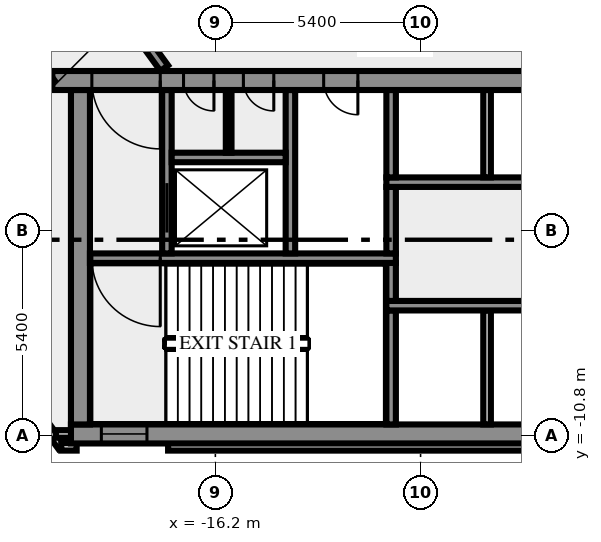
"""IFC4 building model, lengths in metres.
Left out: names, types, materials, properties, quantities, classifications, styles, units other than length and angle.
Written with IfcOpenShell. Run it as: python <this file> out.ifc"""

import sys

from ifc_helpers import new_model, si_unit, direction, frame, frame_2d, origin, place, context, subcontext, project, spatial, rectangle, extrude, element, fill, save


model = new_model("IFC4")
c1 = context("Model", 3, precision=1e-05, world=origin(), true_north=direction((0.0, 1.0)))
c2 = subcontext(c1, "Body", "Model", "MODEL_VIEW")
j1 = project(units=[si_unit("LENGTHUNIT", "METRE"), si_unit("PLANEANGLEUNIT", "RADIAN")], contexts=[c1])
p1 = place(None, origin())
s1 = spatial("IfcSite", under=j1, at=p1, CompositionType="ELEMENT")
p2 = place(p1, origin())
s2 = spatial("IfcBuilding", under=s1, at=p2, CompositionType="ELEMENT")
p3 = place(p2, frame((0.0, 0.0, 79.0)))
s3 = spatial("IfcBuildingStorey", under=s2, at=p3, CompositionType="ELEMENT", Elevation=79.0)
p4 = place(p3, frame((-21.833, -8.909, 0.0), z_axis=(0.0, 0.0, 1.0), x_axis=(0.587766567315, -0.809030569476, 0.0)))
e1 = element("IfcWall", 1, at=p4, inside=s3, PredefinedType="SOLIDWALL", context=c2, shape_type="SweptSolid", body=[
    extrude(rectangle(XDim=2.688, YDim=0.2, at=frame_2d((1.344, 0.0))), origin(), (0.0, 0.0, 1.0), 5.65),
])
p5 = place(p3, frame((-20.256, -11.088, 0.0), z_axis=(0.0, 0.0, 1.0), x_axis=(1.0, 0.0, 0.0)))
e2 = element("IfcWall", 2, at=p5, inside=s3, PredefinedType="SOLIDWALL", context=c2, shape_type="SweptSolid", body=[
    extrude(rectangle(XDim=0.406, YDim=0.2, at=frame_2d((0.203, 0.0))), origin(), (0.0, 0.0, 1.0), 5.65),
])
p6 = place(p3, frame((-17.444, -11.088, 0.0), z_axis=(0.0, 0.0, 1.0), x_axis=(1.0, 0.0, 0.0)))
e3 = element("IfcWall", 3, at=p6, inside=s3, PredefinedType="SOLIDWALL", context=c2, shape_type="SweptSolid", body=[
    extrude(rectangle(XDim=34.888, YDim=0.2, at=frame_2d((17.444, 0.0))), origin(), (0.0, 0.0, 1.0), 5.65),
])
p7 = place(p3, frame((-19.98, -10.75, 0.0), z_axis=(0.0, 0.0, 1.0), x_axis=(-1.0, 0.0, 0.0)))
e4 = element("IfcWall", 4, at=p7, inside=s3, PredefinedType="SOLIDWALL", context=c2, shape_type="SweptSolid", body=[
    extrude(rectangle(XDim=0.417, YDim=0.2, at=frame_2d((0.208, 0.0))), origin(), (0.0, 0.0, 1.0), 5.65),
])
p8 = place(p3, frame((-20.0, -10.75, 0.0), z_axis=(0.0, 0.0, 1.0), x_axis=(1.0, 0.0, 0.0)))
e5 = element("IfcWall", 5, at=p8, inside=s3, PredefinedType="SHEAR", context=c2, shape_type="SweptSolid", body=[
    extrude(rectangle(XDim=40.0, YDim=0.5, at=frame_2d((20.0, 0.0))), origin(), (0.0, 0.0, 1.0), 5.65),
])
p9 = place(p8, frame((0.8, 0.0, 1.0)))
e6 = element("IfcOpeningElement", 6, at=p9, cuts=e5, PredefinedType="OPENING", context=c2, shape_type="SweptSolid", body=[
    extrude(rectangle(XDim=1.2, YDim=1.2, at=frame_2d((0.6, 0.6))), frame((0.0, 0.26, 0.0), z_axis=(0.0, -1.0, 0.0), x_axis=(1.0, 0.0, 0.0)), (0.0, 0.0, 1.0), 0.52),
])
p10 = place(p8, frame((38.0, 0.0, 1.0)))
e7 = element("IfcOpeningElement", 7, at=p10, cuts=e5, PredefinedType="OPENING", context=c2, shape_type="SweptSolid", body=[
    extrude(rectangle(XDim=1.2, YDim=1.2, at=frame_2d((0.6, 0.6))), frame((0.0, 0.26, 0.0), z_axis=(0.0, -1.0, 0.0), x_axis=(1.0, 0.0, 0.0)), (0.0, 0.0, 1.0), 0.52),
])
p11 = place(p3, frame((-19.75, -10.5, 0.0), z_axis=(0.0, 0.0, 1.0), x_axis=(0.0, 1.0, 0.0)))
e8 = element("IfcWall", 8, at=p11, inside=s3, PredefinedType="SHEAR", context=c2, shape_type="SweptSolid", body=[
    extrude(rectangle(XDim=8.8, YDim=0.5, at=frame_2d((4.4, 0.0))), origin(), (0.0, 0.0, 1.0), 5.65),
])
p12 = place(p3, frame((-11.575, -10.5, 0.0), z_axis=(0.0, 0.0, 1.0), x_axis=(0.0, 1.0, 0.0)))
e9 = element("IfcWall", 9, at=p12, inside=s3, PredefinedType="SHEAR", context=c2, shape_type="SweptSolid", body=[
    extrude(rectangle(XDim=3.0, YDim=0.25, at=frame_2d((1.5, 0.0))), origin(), (0.0, 0.0, 1.0), 5.65),
])
p13 = place(p3, frame((-9.05, -10.5, 0.0), z_axis=(0.0, 0.0, 1.0), x_axis=(0.0, 1.0, 0.0)))
e10 = element("IfcWall", 10, at=p13, inside=s3, PredefinedType="SOLIDWALL", context=c2, shape_type="SweptSolid", body=[
    extrude(rectangle(XDim=3.0, YDim=0.2, at=frame_2d((1.5, 0.0))), origin(), (0.0, 0.0, 1.0), 5.65),
])
p14 = place(p3, frame((11.7, -7.375, 0.0), z_axis=(0.0, 0.0, 1.0), x_axis=(-1.0, 0.0, 0.0)))
e11 = element("IfcWall", 11, at=p14, inside=s3, PredefinedType="SHEAR", context=c2, shape_type="SweptSolid", body=[
    extrude(rectangle(XDim=23.4, YDim=0.25, at=frame_2d((11.7, 0.0))), origin(), (0.0, 0.0, 1.0), 5.65),
])
p15 = place(p14, frame((13.975, 0.0, 0.0)))
e12 = element("IfcOpeningElement", 12, at=p15, cuts=e11, PredefinedType="OPENING", context=c2, shape_type="SweptSolid", body=[
    extrude(rectangle(XDim=0.9, YDim=2.1, at=frame_2d((0.45, 1.05))), frame((0.0, 0.135, 0.0), z_axis=(0.0, -1.0, 0.0), x_axis=(1.0, 0.0, 0.0)), (0.0, 0.0, 1.0), 0.27),
])
p16 = place(p14, frame((11.975, 0.0, 0.0)))
e13 = element("IfcOpeningElement", 13, at=p16, cuts=e11, PredefinedType="OPENING", context=c2, shape_type="SweptSolid", body=[
    extrude(rectangle(XDim=0.9, YDim=2.1, at=frame_2d((0.45, 1.05))), frame((0.0, 0.135, 0.0), z_axis=(0.0, -1.0, 0.0), x_axis=(1.0, 0.0, 0.0)), (0.0, 0.0, 1.0), 0.27),
])
p17 = place(p14, frame((10.5, 0.0, 0.0)))
e14 = element("IfcOpeningElement", 14, at=p17, cuts=e11, PredefinedType="OPENING", context=c2, shape_type="SweptSolid", body=[
    extrude(rectangle(XDim=0.9, YDim=2.1, at=frame_2d((0.45, 1.05))), frame((0.0, 0.135, 0.0), z_axis=(0.0, -1.0, 0.0), x_axis=(1.0, 0.0, 0.0)), (0.0, 0.0, 1.0), 0.27),
])
p18 = place(p3, frame((-11.575, -7.25, 0.0), z_axis=(0.0, 0.0, 1.0), x_axis=(0.0, 1.0, 0.0)))
e15 = element("IfcWall", 15, at=p18, inside=s3, PredefinedType="SHEAR", context=c2, shape_type="SweptSolid", body=[
    extrude(rectangle(XDim=1.0, YDim=0.25, at=frame_2d((0.5, 0.0))), origin(), (0.0, 0.0, 1.0), 5.65),
])
p19 = place(p3, frame((-11.45, -6.125, 0.0), z_axis=(0.0, 0.0, 1.0), x_axis=(-1.0, 0.0, 0.0)))
e16 = element("IfcWall", 16, at=p19, inside=s3, PredefinedType="SHEAR", context=c2, shape_type="SweptSolid", body=[
    extrude(rectangle(XDim=8.05, YDim=0.25, at=frame_2d((4.025, 0.0))), origin(), (0.0, 0.0, 1.0), 5.65),
])
p20 = place(p19, frame((6.2, 0.0, 0.0)))
e17 = element("IfcOpeningElement", 17, at=p20, cuts=e16, PredefinedType="OPENING", context=c2, shape_type="SweptSolid", body=[
    extrude(rectangle(XDim=1.8, YDim=2.1, at=frame_2d((0.9, 1.05))), frame((0.0, 0.135, 0.0), z_axis=(0.0, -1.0, 0.0), x_axis=(1.0, 0.0, 0.0)), (0.0, 0.0, 1.0), 0.27),
])
p21 = place(p3, frame((-17.475, -6.0, 0.0), z_axis=(0.0, 0.0, 1.0), x_axis=(0.0, 1.0, 0.0)))
e18 = element("IfcWall", 18, at=p21, inside=s3, PredefinedType="SHEAR", context=c2, shape_type="SweptSolid", body=[
    extrude(rectangle(XDim=4.3, YDim=0.25, at=frame_2d((2.15, 0.0))), origin(), (0.0, 0.0, 1.0), 5.65),
])
p22 = place(p21, frame((0.55, 0.0, 0.0)))
e19 = element("IfcOpeningElement", 19, at=p22, cuts=e18, PredefinedType="OPENING", context=c2, shape_type="SweptSolid", body=[
    extrude(rectangle(XDim=1.3, YDim=2.1, at=frame_2d((0.65, 1.05))), frame((0.0, 0.135, 0.0), z_axis=(0.0, -1.0, 0.0), x_axis=(1.0, 0.0, 0.0)), (0.0, 0.0, 1.0), 0.27),
])
p23 = place(p3, frame((-14.225, -6.0, 0.0), z_axis=(0.0, 0.0, 1.0), x_axis=(0.0, 1.0, 0.0)))
e20 = element("IfcWall", 20, at=p23, inside=s3, PredefinedType="SHEAR", context=c2, shape_type="SweptSolid", body=[
    extrude(rectangle(XDim=4.3, YDim=0.25, at=frame_2d((2.15, 0.0))), origin(), (0.0, 0.0, 1.0), 5.65),
])
p24 = place(p3, frame((-11.575, -6.0, 0.0), z_axis=(0.0, 0.0, 1.0), x_axis=(0.0, 1.0, 0.0)))
e21 = element("IfcWall", 21, at=p24, inside=s3, PredefinedType="SHEAR", context=c2, shape_type="SweptSolid", body=[
    extrude(rectangle(XDim=1.75, YDim=0.25, at=frame_2d((0.875, 0.0))), origin(), (0.0, 0.0, 1.0), 5.65),
])
p25 = place(p3, frame((-11.7, -4.125, 0.0), z_axis=(0.0, 0.0, 1.0), x_axis=(1.0, 0.0, 0.0)))
e22 = element("IfcWall", 22, at=p25, inside=s3, PredefinedType="SHEAR", context=c2, shape_type="SweptSolid", body=[
    extrude(rectangle(XDim=7.75, YDim=0.25, at=frame_2d((3.875, 0.0))), origin(), (0.0, 0.0, 1.0), 5.65),
])
p26 = place(p3, frame((-11.575, -4.0, 0.0), z_axis=(0.0, 0.0, 1.0), x_axis=(0.0, 1.0, 0.0)))
e23 = element("IfcWall", 23, at=p26, inside=s3, PredefinedType="SHEAR", context=c2, shape_type="SweptSolid", body=[
    extrude(rectangle(XDim=2.3, YDim=0.25, at=frame_2d((1.15, 0.0))), origin(), (0.0, 0.0, 1.0), 5.65),
])
p27 = place(p3, frame((-9.05, -4.0, 0.0), z_axis=(0.0, 0.0, 1.0), x_axis=(0.0, 1.0, 0.0)))
e24 = element("IfcWall", 24, at=p27, inside=s3, PredefinedType="SOLIDWALL", context=c2, shape_type="SweptSolid", body=[
    extrude(rectangle(XDim=2.3, YDim=0.2, at=frame_2d((1.15, 0.0))), origin(), (0.0, 0.0, 1.0), 5.65),
])
p28 = place(p3, frame((-17.35, -3.475, 0.0), z_axis=(0.0, 0.0, 1.0), x_axis=(1.0, 0.0, 0.0)))
e25 = element("IfcWall", 25, at=p28, inside=s3, PredefinedType="SHEAR", context=c2, shape_type="SweptSolid", body=[
    extrude(rectangle(XDim=3.0, YDim=0.25, at=frame_2d((1.5, 0.0))), origin(), (0.0, 0.0, 1.0), 5.65),
])
p29 = place(p3, frame((-15.85, -3.35, 0.0), z_axis=(0.0, 0.0, 1.0), x_axis=(0.0, 1.0, 0.0)))
e26 = element("IfcWall", 26, at=p29, inside=s3, PredefinedType="PARTITIONING", context=c2, shape_type="SweptSolid", body=[
    extrude(rectangle(XDim=1.65, YDim=0.15, at=frame_2d((0.825, 0.0))), origin(), (0.0, 0.0, 1.0), 5.65),
])
p30 = place(p3, frame((20.49, -1.45, 0.0), z_axis=(0.0, 0.0, 1.0), x_axis=(-1.0, 0.0, 0.0)))
e27 = element("IfcWall", 27, at=p30, inside=s3, PredefinedType="SHEAR", context=c2, shape_type="SweptSolid", body=[
    extrude(rectangle(XDim=40.98, YDim=0.5, at=frame_2d((20.49, 0.0))), origin(), (0.0, 0.0, 1.0), 5.65),
])
p31 = place(p30, frame((38.14, 0.0, 0.0)))
e28 = element("IfcOpeningElement", 28, at=p31, cuts=e27, PredefinedType="OPENING", context=c2, shape_type="SweptSolid", body=[
    extrude(rectangle(XDim=1.8, YDim=2.1, at=frame_2d((0.9, 1.05))), frame((0.0, 0.26, 0.0), z_axis=(0.0, -1.0, 0.0), x_axis=(1.0, 0.0, 0.0)), (0.0, 0.0, 1.0), 0.52),
])
p32 = place(p30, frame((36.728, 0.0, 0.0)))
e29 = element("IfcOpeningElement", 29, at=p32, cuts=e27, PredefinedType="OPENING", context=c2, shape_type="SweptSolid", body=[
    extrude(rectangle(XDim=0.8, YDim=2.1, at=frame_2d((0.4, 1.05))), frame((0.0, 0.26, 0.0), z_axis=(0.0, -1.0, 0.0), x_axis=(1.0, 0.0, 0.0)), (0.0, 0.0, 1.0), 0.52),
])
p33 = place(p30, frame((35.153, 0.0, 0.0)))
e30 = element("IfcOpeningElement", 30, at=p33, cuts=e27, PredefinedType="OPENING", context=c2, shape_type="SweptSolid", body=[
    extrude(rectangle(XDim=0.8, YDim=2.1, at=frame_2d((0.4, 1.05))), frame((0.0, 0.26, 0.0), z_axis=(0.0, -1.0, 0.0), x_axis=(1.0, 0.0, 0.0)), (0.0, 0.0, 1.0), 0.52),
])
p34 = place(p30, frame((32.94, 0.0, 0.0)))
e31 = element("IfcOpeningElement", 31, at=p34, cuts=e27, PredefinedType="OPENING", context=c2, shape_type="SweptSolid", body=[
    extrude(rectangle(XDim=0.9, YDim=2.1, at=frame_2d((0.45, 1.05))), frame((0.0, 0.26, 0.0), z_axis=(0.0, -1.0, 0.0), x_axis=(1.0, 0.0, 0.0)), (0.0, 0.0, 1.0), 0.52),
])
p35 = place(p30, frame((21.765, 0.0, 0.0)))
e32 = element("IfcOpeningElement", 32, at=p35, cuts=e27, PredefinedType="OPENING", context=c2, shape_type="SweptSolid", body=[
    extrude(rectangle(XDim=2.0, YDim=2.1, at=frame_2d((1.0, 1.05))), frame((0.0, 0.26, 0.0), z_axis=(0.0, -1.0, 0.0), x_axis=(1.0, 0.0, 0.0)), (0.0, 0.0, 1.0), 0.52),
])
p36 = place(p30, frame((7.14, 0.0, 0.0)))
e33 = element("IfcOpeningElement", 33, at=p36, cuts=e27, PredefinedType="OPENING", context=c2, shape_type="SweptSolid", body=[
    extrude(rectangle(XDim=0.9, YDim=2.1, at=frame_2d((0.45, 1.05))), frame((0.0, 0.26, 0.0), z_axis=(0.0, -1.0, 0.0), x_axis=(1.0, 0.0, 0.0)), (0.0, 0.0, 1.0), 0.52),
])
p37 = place(p30, frame((4.19, 0.0, 0.0)))
e34 = element("IfcOpeningElement", 34, at=p37, cuts=e27, PredefinedType="OPENING", context=c2, shape_type="SweptSolid", body=[
    extrude(rectangle(XDim=0.9, YDim=2.1, at=frame_2d((0.45, 1.05))), frame((0.0, 0.26, 0.0), z_axis=(0.0, -1.0, 0.0), x_axis=(1.0, 0.0, 0.0)), (0.0, 0.0, 1.0), 0.52),
])
p38 = place(p30, frame((1.04, 0.0, 0.0)))
e35 = element("IfcOpeningElement", 35, at=p38, cuts=e27, PredefinedType="OPENING", context=c2, shape_type="SweptSolid", body=[
    extrude(rectangle(XDim=1.8, YDim=2.1, at=frame_2d((0.9, 1.05))), frame((0.0, 0.26, 0.0), z_axis=(0.0, -1.0, 0.0), x_axis=(1.0, 0.0, 0.0)), (0.0, 0.0, 1.0), 0.52),
])
p39 = place(p3, frame((-20.531, -1.523, 0.0), z_axis=(0.0, 0.0, 1.0), x_axis=(-0.587785385475, 0.809016897612, 0.0)))
e36 = element("IfcWall", 36, at=p39, inside=s3, PredefinedType="SOLIDWALL", context=c2, shape_type="SweptSolid", body=[
    extrude(rectangle(XDim=50.212, YDim=0.25, at=frame_2d((25.106, 0.0))), origin(), (0.0, 0.0, 1.0), 5.65),
])
p40 = place(p39, frame((22.665, 0.0, 0.0)))
e37 = element("IfcOpeningElement", 37, at=p40, cuts=e36, PredefinedType="OPENING", context=c2, shape_type="SweptSolid", body=[
    extrude(rectangle(XDim=1.2, YDim=2.1, at=frame_2d((0.6, 1.05))), frame((0.0, 0.135, 0.0), z_axis=(0.0, -1.0, 0.0), x_axis=(1.0, 0.0, 0.0)), (0.0, 0.0, 1.0), 0.27),
])
p41 = place(p39, frame((38.865, 0.0, 0.0)))
e38 = element("IfcOpeningElement", 38, at=p41, cuts=e36, PredefinedType="OPENING", context=c2, shape_type="SweptSolid", body=[
    extrude(rectangle(XDim=0.9, YDim=2.1, at=frame_2d((0.45, 1.05))), frame((0.0, 0.135, 0.0), z_axis=(0.0, -1.0, 0.0), x_axis=(1.0, 0.0, 0.0)), (0.0, 0.0, 1.0), 0.27),
])
p42 = place(p39, frame((0.533, 0.0, 0.0)))
e39 = element("IfcOpeningElement", 39, at=p42, cuts=e36, PredefinedType="OPENING", context=c2, shape_type="SweptSolid", body=[
    extrude(rectangle(XDim=1.2, YDim=2.1, at=frame_2d((0.6, 1.05))), frame((0.0, 0.135, 0.0), z_axis=(0.0, -1.0, 0.0), x_axis=(1.0, 0.0, 0.0)), (0.0, 0.0, 1.0), 0.27),
])
p43 = place(p39, frame((15.366, 0.0, 0.0)))
e40 = element("IfcOpeningElement", 40, at=p43, cuts=e36, PredefinedType="OPENING", context=c2, shape_type="SweptSolid", body=[
    extrude(rectangle(XDim=1.2, YDim=2.1, at=frame_2d((0.6, 1.05))), frame((0.0, 0.135, 0.0), z_axis=(0.0, -1.0, 0.0), x_axis=(1.0, 0.0, 0.0)), (0.0, 0.0, 1.0), 0.27),
])
p44 = place(p39, frame((21.066, 0.0, 0.0)))
e41 = element("IfcOpeningElement", 41, at=p44, cuts=e36, PredefinedType="OPENING", context=c2, shape_type="SweptSolid", body=[
    extrude(rectangle(XDim=0.9, YDim=2.1, at=frame_2d((0.45, 1.05))), frame((0.0, 0.135, 0.0), z_axis=(0.0, -1.0, 0.0), x_axis=(1.0, 0.0, 0.0)), (0.0, 0.0, 1.0), 0.27),
])
p45 = place(p3, frame((-37.232, 25.972, 0.0), z_axis=(0.0, 0.0, 1.0), x_axis=(0.587786323093, -0.809016216391, 0.0)))
e42 = element("IfcWall", 42, at=p45, inside=s3, PredefinedType="SOLIDWALL", context=c2, shape_type="SweptSolid", body=[
    extrude(rectangle(XDim=33.493, YDim=0.25, at=frame_2d((16.747, 0.0))), origin(), (0.0, 0.0, 1.0), 5.65),
])
p46 = place(p45, frame((13.185, 0.0, 0.0)))
e43 = element("IfcOpeningElement", 43, at=p46, cuts=e42, PredefinedType="OPENING", context=c2, shape_type="SweptSolid", body=[
    extrude(rectangle(XDim=1.2, YDim=2.1, at=frame_2d((0.6, 1.05))), frame((0.0, 0.135, 0.0), z_axis=(0.0, -1.0, 0.0), x_axis=(1.0, 0.0, 0.0)), (0.0, 0.0, 1.0), 0.27),
])
p47 = place(p45, frame((29.152, 0.0, 0.0)))
e44 = element("IfcOpeningElement", 44, at=p47, cuts=e42, PredefinedType="OPENING", context=c2, shape_type="SweptSolid", body=[
    extrude(rectangle(XDim=0.9, YDim=2.1, at=frame_2d((0.45, 1.05))), frame((0.0, 0.135, 0.0), z_axis=(0.0, -1.0, 0.0), x_axis=(1.0, 0.0, 0.0)), (0.0, 0.0, 1.0), 0.27),
])
p48 = place(p45, frame((2.385, 0.0, 0.0)))
e45 = element("IfcOpeningElement", 45, at=p48, cuts=e42, PredefinedType="OPENING", context=c2, shape_type="SweptSolid", body=[
    extrude(rectangle(XDim=1.2, YDim=2.1, at=frame_2d((0.6, 1.05))), frame((0.0, 0.135, 0.0), z_axis=(0.0, -1.0, 0.0), x_axis=(1.0, 0.0, 0.0)), (0.0, 0.0, 1.0), 0.27),
])
p49 = place(p45, frame((8.085, 0.0, 0.0)))
e46 = element("IfcOpeningElement", 46, at=p49, cuts=e42, PredefinedType="OPENING", context=c2, shape_type="SweptSolid", body=[
    extrude(rectangle(XDim=0.9, YDim=2.1, at=frame_2d((0.45, 1.05))), frame((0.0, 0.135, 0.0), z_axis=(0.0, -1.0, 0.0), x_axis=(1.0, 0.0, 0.0)), (0.0, 0.0, 1.0), 0.27),
])
p50 = place(p9, origin())
e47 = element("IfcWindow", 47, at=p50, inside=s3, PartitioningType="SINGLE_PANEL", PredefinedType="WINDOW", context=c2, shape_type="SweptSolid", body=[
    extrude(rectangle(XDim=1.2, YDim=1.2, at=frame_2d((0.6, 0.6))), frame((0.0, 0.03, 0.0), z_axis=(0.0, -1.0, 0.0), x_axis=(1.0, 0.0, 0.0)), (0.0, 0.0, 1.0), 0.06),
])
fill(e6, e47)
p51 = place(p20, origin())
e48 = element("IfcDoor", 48, at=p51, inside=s3, OperationType="DOUBLE_DOOR_SINGLE_SWING", PredefinedType="DOOR", context=c2, shape_type="SweptSolid", body=[
    extrude(rectangle(XDim=1.8, YDim=2.1, at=frame_2d((0.9, 1.05))), frame((0.0, 0.025, 0.0), z_axis=(0.0, -1.0, 0.0), x_axis=(1.0, 0.0, 0.0)), (0.0, 0.0, 1.0), 0.05),
])
fill(e17, e48)
p52 = place(p22, origin())
e49 = element("IfcDoor", 49, at=p52, inside=s3, OperationType="DOUBLE_DOOR_SLIDING", PredefinedType="DOOR", context=c2, shape_type="SweptSolid", body=[
    extrude(rectangle(XDim=1.3, YDim=2.1, at=frame_2d((0.65, 1.05))), frame((0.0, 0.025, 0.0), z_axis=(0.0, -1.0, 0.0), x_axis=(1.0, 0.0, 0.0)), (0.0, 0.0, 1.0), 0.05),
])
fill(e19, e49)
p53 = place(p31, origin())
e50 = element("IfcDoor", 50, at=p53, inside=s3, OperationType="DOUBLE_DOOR_SINGLE_SWING", PredefinedType="DOOR", context=c2, shape_type="SweptSolid", body=[
    extrude(rectangle(XDim=1.8, YDim=2.1, at=frame_2d((0.9, 1.05))), frame((0.0, 0.025, 0.0), z_axis=(0.0, -1.0, 0.0), x_axis=(1.0, 0.0, 0.0)), (0.0, 0.0, 1.0), 0.05),
])
fill(e28, e50)
p54 = place(p32, origin())
e51 = element("IfcDoor", 51, at=p54, inside=s3, OperationType="SINGLE_SWING_RIGHT", PredefinedType="DOOR", context=c2, shape_type="SweptSolid", body=[
    extrude(rectangle(XDim=0.8, YDim=2.1, at=frame_2d((0.4, 1.05))), frame((0.0, 0.025, 0.0), z_axis=(0.0, -1.0, 0.0), x_axis=(1.0, 0.0, 0.0)), (0.0, 0.0, 1.0), 0.05),
])
fill(e29, e51)
p55 = place(p33, origin())
e52 = element("IfcDoor", 52, at=p55, inside=s3, OperationType="SINGLE_SWING_RIGHT", PredefinedType="DOOR", context=c2, shape_type="SweptSolid", body=[
    extrude(rectangle(XDim=0.8, YDim=2.1, at=frame_2d((0.4, 1.05))), frame((0.0, 0.025, 0.0), z_axis=(0.0, -1.0, 0.0), x_axis=(1.0, 0.0, 0.0)), (0.0, 0.0, 1.0), 0.05),
])
fill(e30, e52)
p56 = place(p34, origin())
e53 = element("IfcDoor", 53, at=p56, inside=s3, OperationType="SINGLE_SWING_RIGHT", PredefinedType="DOOR", context=c2, shape_type="SweptSolid", body=[
    extrude(rectangle(XDim=0.9, YDim=2.1, at=frame_2d((0.45, 1.05))), frame((0.0, 0.025, 0.0), z_axis=(0.0, -1.0, 0.0), x_axis=(1.0, 0.0, 0.0)), (0.0, 0.0, 1.0), 0.05),
])
fill(e31, e53)
save(model, sys.argv[1])
